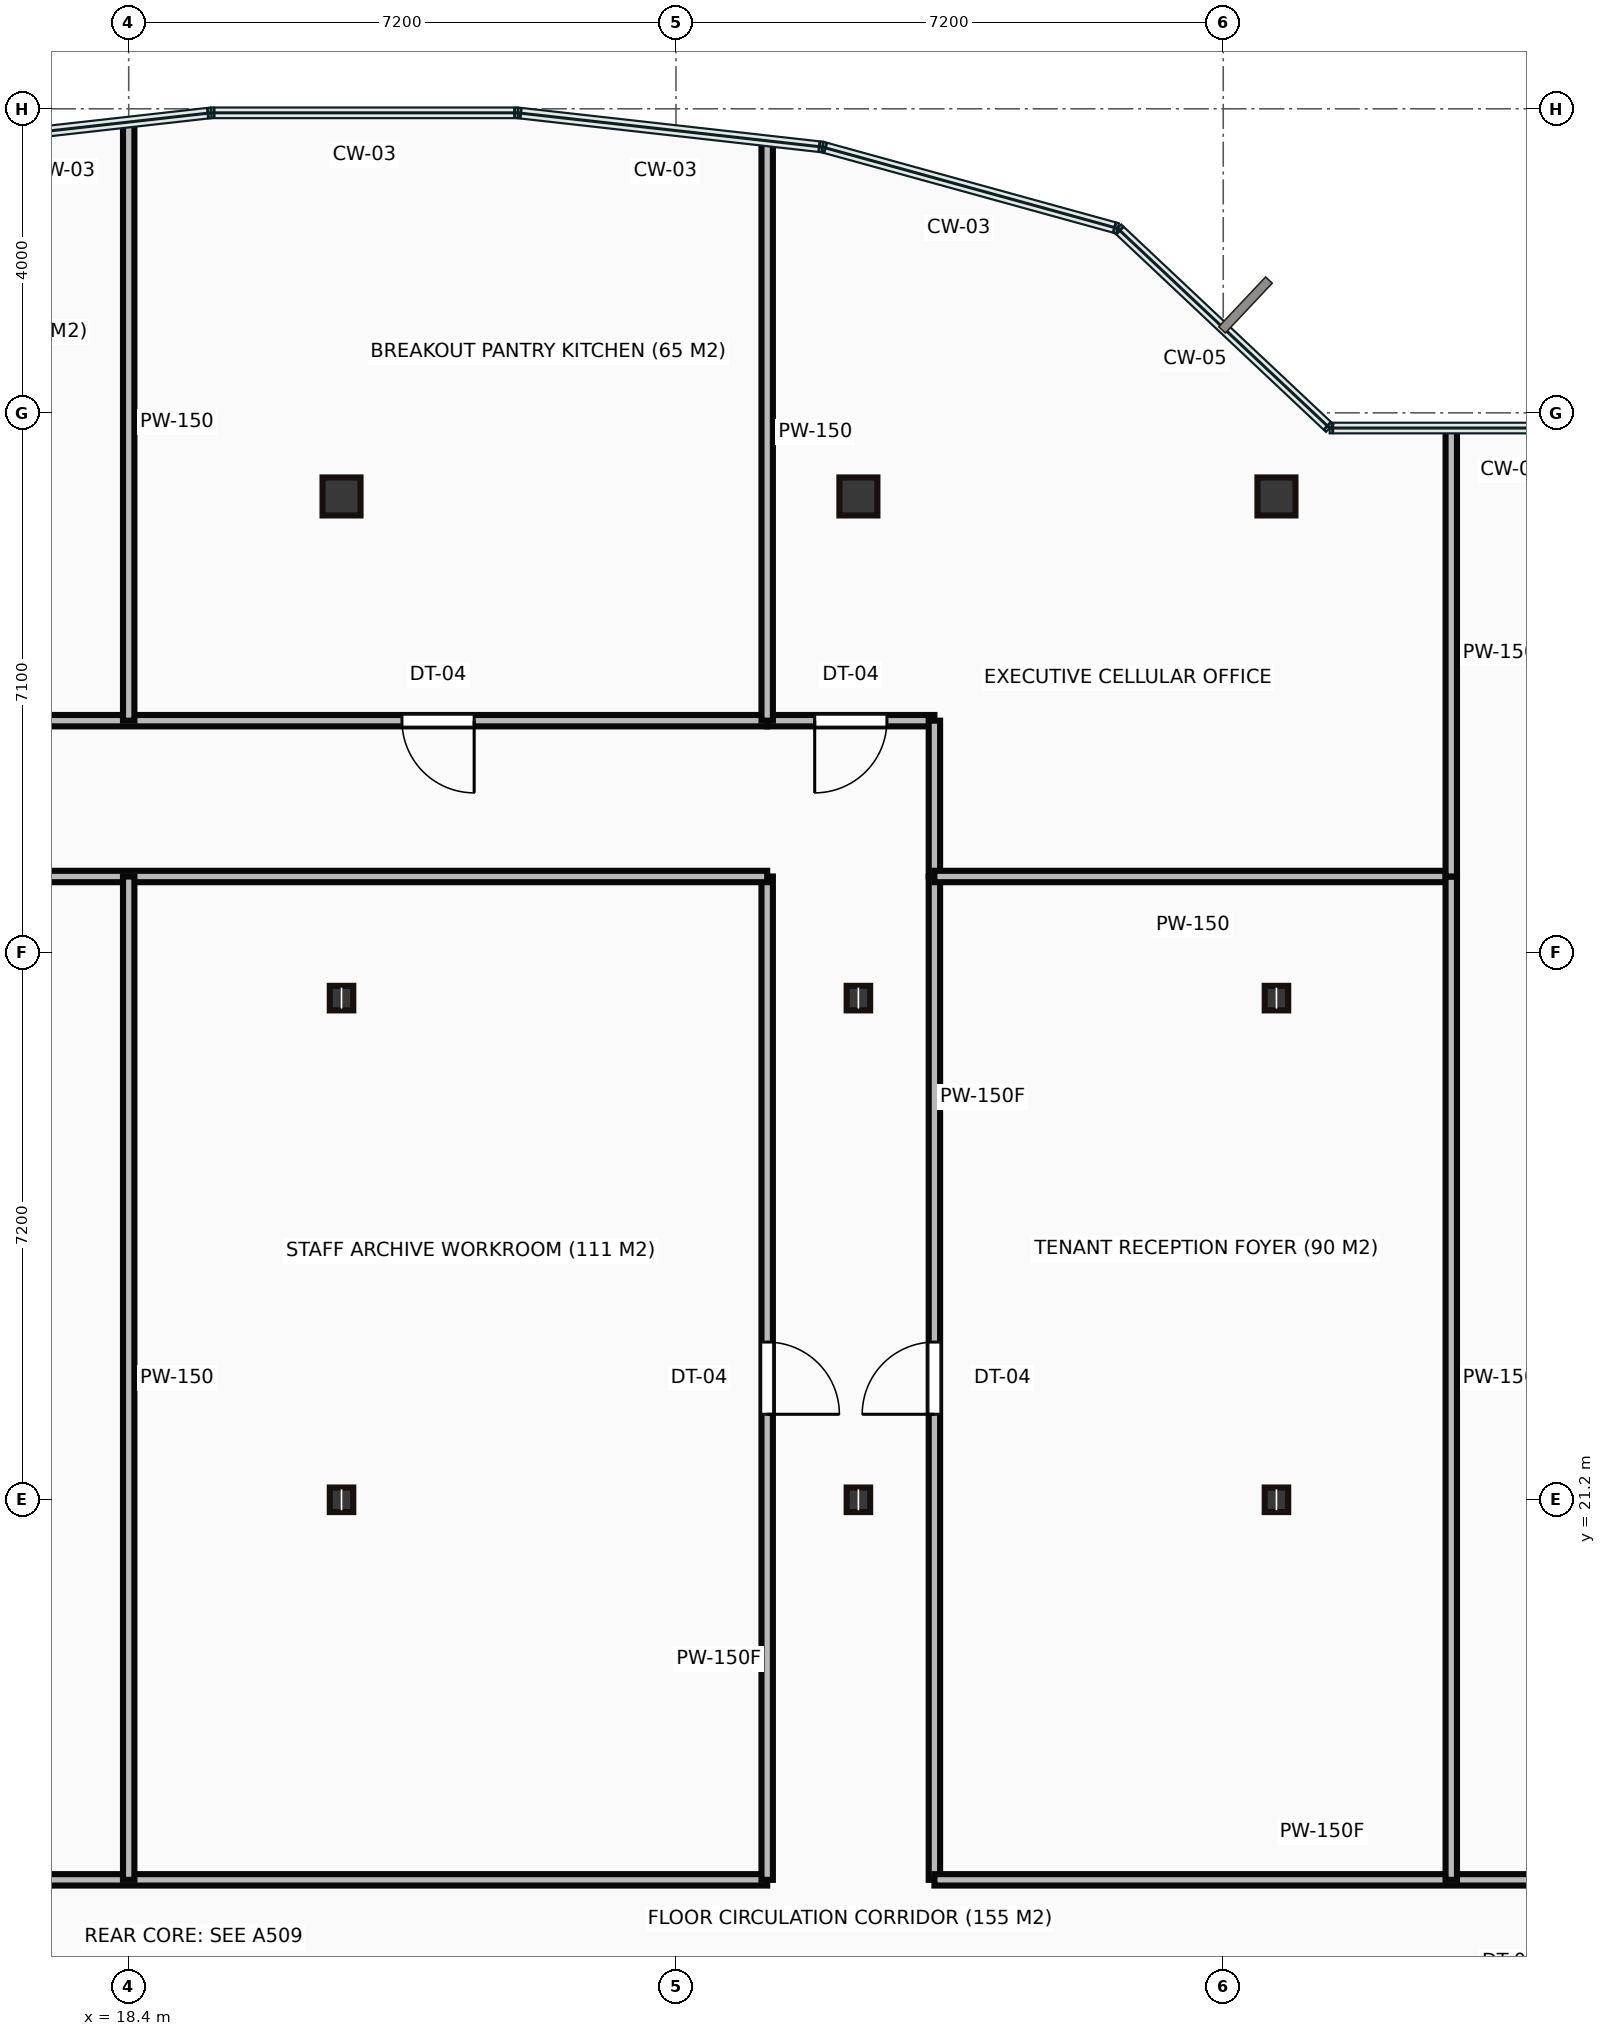
"""IFC4 building model, lengths in metres.
Left out: names, types, materials, properties, quantities, classifications, styles, units other than length and angle.
Written with IfcOpenShell. Run it as: python <this file> out.ifc"""

import sys

from ifc_helpers import new_model, si_unit, direction, frame, frame_2d, origin, origin_2d, place, context, subcontext, project, spatial, rectangle, hollow_rectangle, i_section, extrude, source, transform, mapped, element, fill, save


model = new_model("IFC4")
c1 = context("Model", 3, precision=1e-05, world=origin(), true_north=direction((0.0, 1.0)))
c2 = subcontext(c1, "Body", "Model", "MODEL_VIEW")
j1 = project(units=[si_unit("LENGTHUNIT", "METRE"), si_unit("PLANEANGLEUNIT", "RADIAN")], contexts=[c1])
p1 = place(None, origin())
s1 = spatial("IfcSite", under=j1, at=p1, CompositionType="ELEMENT")
p2 = place(p1, origin())
s2 = spatial("IfcBuilding", under=s1, at=p2, CompositionType="ELEMENT")
p3 = place(p2, frame((0.0, 0.0, 203.2)))
s3 = spatial("IfcBuildingStorey", under=s2, at=p3, CompositionType="ELEMENT", Elevation=203.2)
m1 = source(origin(), c2, "Body", "SweptSolid", [
    extrude(i_section(OverallWidth=0.309, OverallDepth=0.323, WebThickness=0.014, FlangeThickness=0.023, at=origin_2d()), origin(), (0.0, 0.0, 1.0), 3.65),
])
for number, where, z_axis, x_axis in (
    (1, (21.2, 21.2, 0.0), (0.0, 0.0, 1.0), (1.0, 0.0, 0.0)),
    (2, (21.2, 27.8, 0.0), (0.0, 0.0, 1.0), (1.0, 0.0, 0.0)),
):
    element("IfcColumn", number, at=place(p3, frame(where, z_axis=z_axis, x_axis=x_axis)), inside=s3, PredefinedType="COLUMN", context=c2, shape_type="MappedRepresentation", body=[
        mapped(m1, transform((0.0, 0.0, 0.0))),
    ])
m2 = source(origin(), c2, "Body", "SweptSolid", [
    extrude(hollow_rectangle(XDim=0.5, YDim=0.5, WallThickness=0.022, at=origin_2d()), origin(), (0.0, 0.0, 1.0), 3.65),
])
p4 = place(p3, frame((21.2, 34.4, 0.0), z_axis=(0.0, 0.0, 1.0), x_axis=(1.0, 0.0, 0.0)))
e3 = element("IfcColumn", 3, at=p4, inside=s3, PredefinedType="COLUMN", context=c2, shape_type="MappedRepresentation", body=[
    mapped(m2, transform((0.0, 0.0, 0.0))),
])
for number, where, z_axis, x_axis in (
    (4, (28.0, 21.2, 0.0), (0.0, 0.0, 1.0), (1.0, 0.0, 0.0)),
    (5, (28.0, 27.8, 0.0), (0.0, 0.0, 1.0), (1.0, 0.0, 0.0)),
):
    element("IfcColumn", number, at=place(p3, frame(where, z_axis=z_axis, x_axis=x_axis)), inside=s3, PredefinedType="COLUMN", context=c2, shape_type="MappedRepresentation", body=[
        mapped(m1, transform((0.0, 0.0, 0.0))),
    ])
p5 = place(p3, frame((28.0, 34.4, 0.0), z_axis=(0.0, 0.0, 1.0), x_axis=(1.0, 0.0, 0.0)))
e6 = element("IfcColumn", 6, at=p5, inside=s3, PredefinedType="COLUMN", context=c2, shape_type="MappedRepresentation", body=[
    mapped(m2, transform((0.0, 0.0, 0.0))),
])
for number, where, z_axis, x_axis in (
    (7, (33.5, 21.2, 0.0), (0.0, 0.0, 1.0), (1.0, 0.0, 0.0)),
    (8, (33.5, 27.8, 0.0), (0.0, 0.0, 1.0), (1.0, 0.0, 0.0)),
):
    element("IfcColumn", number, at=place(p3, frame(where, z_axis=z_axis, x_axis=x_axis)), inside=s3, PredefinedType="COLUMN", context=c2, shape_type="MappedRepresentation", body=[
        mapped(m1, transform((0.0, 0.0, 0.0))),
    ])
p6 = place(p3, frame((33.5, 34.4, 0.0), z_axis=(0.0, 0.0, 1.0), x_axis=(1.0, 0.0, 0.0)))
e9 = element("IfcColumn", 9, at=p6, inside=s3, PredefinedType="COLUMN", context=c2, shape_type="MappedRepresentation", body=[
    mapped(m2, transform((0.0, 0.0, 0.0))),
])
m3 = source(origin(), c2, "Body", "SweptSolid", [
    extrude(rectangle(XDim=22.2, YDim=0.15, at=frame_2d((11.1, 0.0))), origin(), (0.0, 0.0, 1.0), 3.4),
])
p7 = place(p3, frame((4.6, 16.2, 0.0), z_axis=(0.0, 0.0, 1.0), x_axis=(1.0, 0.0, 0.0)))
e10 = element("IfcWall", 10, at=p7, inside=s3, PredefinedType="PARTITIONING", context=c2, shape_type="MappedRepresentation", body=[
    mapped(m3, transform((0.0, 0.0, 0.0))),
])
p8 = place(p7, frame((2.255, 0.0, 0.0)))
e11 = element("IfcOpeningElement", 11, at=p8, cuts=e10, PredefinedType="OPENING", context=c2, shape_type="SweptSolid", body=[
    extrude(rectangle(XDim=0.95, YDim=2.15, at=frame_2d((0.475, 1.075))), frame((0.0, 0.085, 0.0), z_axis=(0.0, -1.0, 0.0), x_axis=(1.0, 0.0, 0.0)), (0.0, 0.0, 1.0), 0.17),
])
p9 = place(p7, frame((9.025, 0.0, 0.0)))
e12 = element("IfcOpeningElement", 12, at=p9, cuts=e10, PredefinedType="OPENING", context=c2, shape_type="SweptSolid", body=[
    extrude(rectangle(XDim=0.95, YDim=2.15, at=frame_2d((0.475, 1.075))), frame((0.0, 0.085, 0.0), z_axis=(0.0, -1.0, 0.0), x_axis=(1.0, 0.0, 0.0)), (0.0, 0.0, 1.0), 0.17),
])
m4 = source(origin(), c2, "Body", "SweptSolid", [
    extrude(rectangle(XDim=13.2, YDim=0.15, at=frame_2d((6.6, 0.0))), origin(), (0.0, 0.0, 1.0), 3.4),
])
p10 = place(p3, frame((26.8, 16.2, 0.0), z_axis=(0.0, 0.0, 1.0), x_axis=(0.0, 1.0, 0.0)))
e13 = element("IfcWall", 13, at=p10, inside=s3, PredefinedType="PARTITIONING", context=c2, shape_type="MappedRepresentation", body=[
    mapped(m4, transform((0.0, 0.0, 0.0))),
])
p11 = place(p10, frame((6.125, 0.0, 0.0)))
e14 = element("IfcOpeningElement", 14, at=p11, cuts=e13, PredefinedType="OPENING", context=c2, shape_type="SweptSolid", body=[
    extrude(rectangle(XDim=0.95, YDim=2.15, at=frame_2d((0.475, 1.075))), frame((0.0, 0.085, 0.0), z_axis=(0.0, -1.0, 0.0), x_axis=(1.0, 0.0, 0.0)), (0.0, 0.0, 1.0), 0.17),
])
p12 = place(p3, frame((26.8, 29.4, 0.0), z_axis=(0.0, 0.0, 1.0), x_axis=(-1.0, 0.0, 0.0)))
e15 = element("IfcWall", 15, at=p12, inside=s3, PredefinedType="PARTITIONING", context=c2, shape_type="MappedRepresentation", body=[
    mapped(m3, transform((0.0, 0.0, 0.0))),
])
p13 = place(p3, frame((4.6, 31.45, 0.0), z_axis=(0.0, 0.0, 1.0), x_axis=(1.0, 0.0, 0.0)))
e16 = element("IfcWall", 16, at=p13, inside=s3, PredefinedType="PARTITIONING", context=c2, shape_type="MappedRepresentation", body=[
    mapped(m3, transform((0.0, 0.0, 0.0))),
])
p14 = place(p13, frame((6.555, 0.0, 0.0)))
e17 = element("IfcOpeningElement", 17, at=p14, cuts=e16, PredefinedType="OPENING", context=c2, shape_type="SweptSolid", body=[
    extrude(rectangle(XDim=0.95, YDim=2.15, at=frame_2d((0.475, 1.075))), frame((0.0, 0.085, 0.0), z_axis=(0.0, -1.0, 0.0), x_axis=(1.0, 0.0, 0.0)), (0.0, 0.0, 1.0), 0.17),
])
p15 = place(p13, frame((17.395, 0.0, 0.0)))
e18 = element("IfcOpeningElement", 18, at=p15, cuts=e16, PredefinedType="OPENING", context=c2, shape_type="SweptSolid", body=[
    extrude(rectangle(XDim=0.95, YDim=2.15, at=frame_2d((0.475, 1.075))), frame((0.0, 0.085, 0.0), z_axis=(0.0, -1.0, 0.0), x_axis=(1.0, 0.0, 0.0)), (0.0, 0.0, 1.0), 0.17),
])
m5 = source(origin(), c2, "Body", "SweptSolid", [
    extrude(rectangle(XDim=2.2, YDim=0.15, at=frame_2d((1.1, 0.0))), origin(), (0.0, 0.0, 1.0), 3.4),
])
p16 = place(p3, frame((26.8, 31.45, 0.0), z_axis=(0.0, 0.0, 1.0), x_axis=(1.0, 0.0, 0.0)))
e19 = element("IfcWall", 19, at=p16, inside=s3, PredefinedType="PARTITIONING", context=c2, shape_type="MappedRepresentation", body=[
    mapped(m5, transform((0.0, 0.0, 0.0))),
])
p17 = place(p16, frame((0.625, 0.0, 0.0)))
e20 = element("IfcOpeningElement", 20, at=p17, cuts=e19, PredefinedType="OPENING", context=c2, shape_type="SweptSolid", body=[
    extrude(rectangle(XDim=0.95, YDim=2.15, at=frame_2d((0.475, 1.075))), frame((0.0, 0.085, 0.0), z_axis=(0.0, -1.0, 0.0), x_axis=(1.0, 0.0, 0.0)), (0.0, 0.0, 1.0), 0.17),
])
m6 = source(origin(), c2, "Body", "SweptSolid", [
    extrude(rectangle(XDim=2.05, YDim=0.15, at=frame_2d((1.025, 0.0))), origin(), (0.0, 0.0, 1.0), 3.4),
])
p18 = place(p3, frame((29.0, 31.45, 0.0), z_axis=(0.0, 0.0, 1.0), x_axis=(0.0, -1.0, 0.0)))
e21 = element("IfcWall", 21, at=p18, inside=s3, PredefinedType="PARTITIONING", context=c2, shape_type="MappedRepresentation", body=[
    mapped(m6, transform((0.0, 0.0, 0.0))),
])
p19 = place(p3, frame((29.0, 29.4, 0.0), z_axis=(0.0, 0.0, 1.0), x_axis=(0.0, -1.0, 0.0)))
e22 = element("IfcWall", 22, at=p19, inside=s3, PredefinedType="PARTITIONING", context=c2, shape_type="MappedRepresentation", body=[
    mapped(m4, transform((0.0, 0.0, 0.0))),
])
p20 = place(p19, frame((6.125, 0.0, 0.0)))
e23 = element("IfcOpeningElement", 23, at=p20, cuts=e22, PredefinedType="OPENING", context=c2, shape_type="SweptSolid", body=[
    extrude(rectangle(XDim=0.95, YDim=2.15, at=frame_2d((0.475, 1.075))), frame((0.0, 0.085, 0.0), z_axis=(0.0, -1.0, 0.0), x_axis=(1.0, 0.0, 0.0)), (0.0, 0.0, 1.0), 0.17),
])
m7 = source(origin(), c2, "Body", "SweptSolid", [
    extrude(rectangle(XDim=10.2, YDim=0.15, at=frame_2d((5.1, 0.0))), origin(), (0.0, 0.0, 1.0), 3.4),
])
p21 = place(p3, frame((29.0, 16.2, 0.0), z_axis=(0.0, 0.0, 1.0), x_axis=(1.0, 0.0, 0.0)))
e24 = element("IfcWall", 24, at=p21, inside=s3, PredefinedType="PARTITIONING", context=c2, shape_type="MappedRepresentation", body=[
    mapped(m7, transform((0.0, 0.0, 0.0))),
])
p22 = place(p21, frame((7.895, 0.0, 0.0)))
e25 = element("IfcOpeningElement", 25, at=p22, cuts=e24, PredefinedType="OPENING", context=c2, shape_type="SweptSolid", body=[
    extrude(rectangle(XDim=0.95, YDim=2.15, at=frame_2d((0.475, 1.075))), frame((0.0, 0.085, 0.0), z_axis=(0.0, -1.0, 0.0), x_axis=(1.0, 0.0, 0.0)), (0.0, 0.0, 1.0), 0.17),
])
p23 = place(p3, frame((18.4, 29.4, 0.0), z_axis=(0.0, 0.0, 1.0), x_axis=(0.0, -1.0, 0.0)))
e26 = element("IfcWall", 26, at=p23, inside=s3, PredefinedType="PARTITIONING", context=c2, shape_type="MappedRepresentation", body=[
    mapped(m4, transform((0.0, 0.0, 0.0))),
])
m8 = source(origin(), c2, "Body", "SweptSolid", [
    extrude(rectangle(XDim=7.855, YDim=0.15, at=frame_2d((3.928, 0.0))), origin(), (0.0, 0.0, 1.0), 3.4),
])
p24 = place(p3, frame((18.4, 39.305, 0.0), z_axis=(0.0, 0.0, 1.0), x_axis=(0.0, -1.0, 0.0)))
e27 = element("IfcWall", 27, at=p24, inside=s3, PredefinedType="PARTITIONING", context=c2, shape_type="MappedRepresentation", body=[
    mapped(m8, transform((0.0, 0.0, 0.0))),
])
m9 = source(origin(), c2, "Body", "SweptSolid", [
    extrude(rectangle(XDim=7.608, YDim=0.15, at=frame_2d((3.804, 0.0))), origin(), (0.0, 0.0, 1.0), 3.4),
])
p25 = place(p3, frame((26.8, 39.058, 0.0), z_axis=(0.0, 0.0, 1.0), x_axis=(0.0, -1.0, 0.0)))
e28 = element("IfcWall", 28, at=p25, inside=s3, PredefinedType="PARTITIONING", context=c2, shape_type="MappedRepresentation", body=[
    mapped(m9, transform((0.0, 0.0, 0.0))),
])
m10 = source(origin(), c2, "Body", "SweptSolid", [
    extrude(rectangle(XDim=6.8, YDim=0.15, at=frame_2d((3.4, 0.0))), origin(), (0.0, 0.0, 1.0), 3.4),
])
p26 = place(p3, frame((35.8, 29.4, 0.0), z_axis=(0.0, 0.0, 1.0), x_axis=(-1.0, 0.0, 0.0)))
e29 = element("IfcWall", 29, at=p26, inside=s3, PredefinedType="PARTITIONING", context=c2, shape_type="MappedRepresentation", body=[
    mapped(m10, transform((0.0, 0.0, 0.0))),
])
p27 = place(p3, frame((35.8, 29.4, 0.0), z_axis=(0.0, 0.0, 1.0), x_axis=(0.0, -1.0, 0.0)))
e30 = element("IfcWall", 30, at=p27, inside=s3, PredefinedType="PARTITIONING", context=c2, shape_type="MappedRepresentation", body=[
    mapped(m4, transform((0.0, 0.0, 0.0))),
])
m11 = source(origin(), c2, "Body", "SweptSolid", [
    extrude(rectangle(XDim=5.88, YDim=0.15, at=frame_2d((2.94, 0.0))), origin(), (0.0, 0.0, 1.0), 3.4),
])
p28 = place(p3, frame((35.8, 35.28, 0.0), z_axis=(0.0, 0.0, 1.0), x_axis=(0.0, -1.0, 0.0)))
e31 = element("IfcWall", 31, at=p28, inside=s3, PredefinedType="PARTITIONING", context=c2, shape_type="MappedRepresentation", body=[
    mapped(m11, transform((0.0, 0.0, 0.0))),
])
m12 = source(origin(), c2, "Body", "SweptSolid", [
    extrude(rectangle(XDim=0.95, YDim=2.15, at=frame_2d((0.475, 1.075))), frame((0.0, 0.025, 0.0), z_axis=(0.0, -1.0, 0.0), x_axis=(1.0, 0.0, 0.0)), (0.0, 0.0, 1.0), 0.05),
])
p29 = place(p11, origin())
e32 = element("IfcDoor", 32, at=p29, inside=s3, OperationType="SINGLE_SWING_LEFT", PredefinedType="DOOR", context=c2, shape_type="MappedRepresentation", body=[
    mapped(m12, transform((0.0, 0.0, 0.0))),
])
fill(e14, e32)
p30 = place(p15, origin())
e33 = element("IfcDoor", 33, at=p30, inside=s3, OperationType="SINGLE_SWING_RIGHT", PredefinedType="DOOR", context=c2, shape_type="MappedRepresentation", body=[
    mapped(m12, transform((0.0, 0.0, 0.0))),
])
fill(e18, e33)
p31 = place(p17, origin())
e34 = element("IfcDoor", 34, at=p31, inside=s3, OperationType="SINGLE_SWING_LEFT", PredefinedType="DOOR", context=c2, shape_type="MappedRepresentation", body=[
    mapped(m12, transform((0.0, 0.0, 0.0))),
])
fill(e20, e34)
p32 = place(p20, origin())
e35 = element("IfcDoor", 35, at=p32, inside=s3, OperationType="SINGLE_SWING_RIGHT", PredefinedType="DOOR", context=c2, shape_type="MappedRepresentation", body=[
    mapped(m12, transform((0.0, 0.0, 0.0))),
])
fill(e23, e35)
save(model, sys.argv[1])
